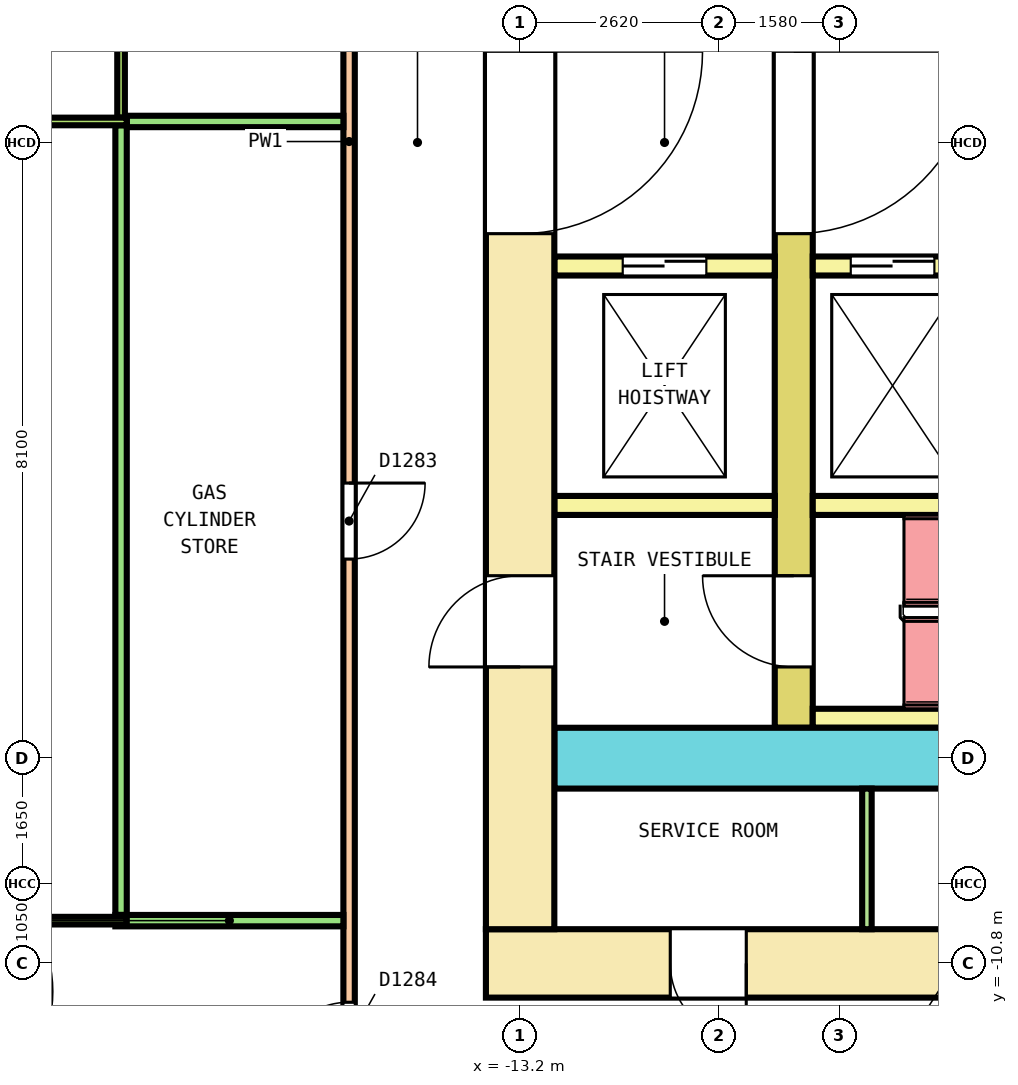
"""IFC4 building model, lengths in metres.
Left out: names, types, materials, properties, quantities, classifications, styles, units other than length and angle.
Written with IfcOpenShell. Run it as: python <this file> out.ifc"""

import sys

from ifc_helpers import new_model, si_unit, direction, frame, frame_2d, origin, place, context, subcontext, project, spatial, polyline, rectangle, outline, extrude, element, fill, save


model = new_model("IFC4")
c1 = context("Model", 3, precision=1e-05, world=origin(), true_north=direction((0.0, 1.0)))
c2 = subcontext(c1, "Body", "Model", "MODEL_VIEW")
j1 = project(units=[si_unit("LENGTHUNIT", "METRE"), si_unit("PLANEANGLEUNIT", "RADIAN")], contexts=[c1])
p1 = place(None, origin())
s1 = spatial("IfcSite", under=j1, at=p1, CompositionType="ELEMENT")
p2 = place(p1, origin())
s2 = spatial("IfcBuilding", under=s1, at=p2, CompositionType="ELEMENT")
p3 = place(p2, frame((0.0, 0.0, 23.4)))
s3 = spatial("IfcBuildingStorey", under=s2, at=p3, CompositionType="ELEMENT", Elevation=23.4)
p4 = place(p3, frame((-25.772, -3.161, 0.0), z_axis=(0.0, 0.0, 1.0), x_axis=(0.500001833672, -0.866024345111, 0.0)))
e1 = element("IfcWall", 1, at=p4, inside=s3, PredefinedType="SOLIDWALL", context=c2, shape_type="SweptSolid", body=[
    extrude(outline(polyline([(-0.027, -0.1), (0.991, -0.1), (2.008, -0.1), (3.026, -0.1), (4.043, -0.1), (5.061, -0.1), (6.079, -0.1), (7.096, -0.1), (8.114, -0.1), (9.131, -0.1), (10.149, -0.1), (11.167, -0.1), (12.184, -0.1), (13.202, -0.1), (14.219, -0.1), (15.237, -0.1), (16.254, -0.1), (17.272, -0.1), (18.29, -0.1), (19.307, -0.1), (20.325, -0.1), (20.271, 0.1), (19.259, 0.1), (18.247, 0.1), (17.234, 0.1), (16.222, 0.1), (15.21, 0.1), (14.198, 0.1), (13.186, 0.1), (12.173, 0.1), (11.161, 0.1), (10.149, 0.1), (9.137, 0.1), (8.125, 0.1), (7.112, 0.1), (6.1, 0.1), (5.088, 0.1), (4.076, 0.1), (3.063, 0.1), (2.051, 0.1), (1.039, 0.1), (0.027, 0.1), (-0.027, -0.1)])), origin(), (0.0, 0.0, 1.0), 4.1),
])
p5 = place(p4, frame((0.38, 0.0, 0.1)))
e2 = element("IfcOpeningElement", 2, at=p5, cuts=e1, PredefinedType="OPENING", context=c2, shape_type="SweptSolid", body=[
    extrude(rectangle(XDim=3.3, YDim=2.9, at=frame_2d((1.65, 1.45))), frame((0.0, 0.11, 0.0), z_axis=(0.0, -1.0, 0.0), x_axis=(1.0, 0.0, 0.0)), (0.0, 0.0, 1.0), 0.22),
])
p6 = place(p4, frame((4.439, 0.0, 0.1)))
e3 = element("IfcOpeningElement", 3, at=p6, cuts=e1, PredefinedType="OPENING", context=c2, shape_type="SweptSolid", body=[
    extrude(rectangle(XDim=3.3, YDim=2.9, at=frame_2d((1.65, 1.45))), frame((0.0, 0.11, 0.0), z_axis=(0.0, -1.0, 0.0), x_axis=(1.0, 0.0, 0.0)), (0.0, 0.0, 1.0), 0.22),
])
p7 = place(p4, frame((9.249, 0.0, 0.0)))
e4 = element("IfcOpeningElement", 4, at=p7, cuts=e1, PredefinedType="OPENING", context=c2, shape_type="SweptSolid", body=[
    extrude(rectangle(XDim=1.8, YDim=2.4, at=frame_2d((0.9, 1.2))), frame((0.0, 0.11, 0.0), z_axis=(0.0, -1.0, 0.0), x_axis=(1.0, 0.0, 0.0)), (0.0, 0.0, 1.0), 0.22),
])
p8 = place(p4, frame((9.249, 0.0, 2.55)))
e5 = element("IfcOpeningElement", 5, at=p8, cuts=e1, PredefinedType="OPENING", context=c2, shape_type="SweptSolid", body=[
    extrude(rectangle(XDim=1.8, YDim=0.45, at=frame_2d((0.9, 0.225))), frame((0.0, 0.11, 0.0), z_axis=(0.0, -1.0, 0.0), x_axis=(1.0, 0.0, 0.0)), (0.0, 0.0, 1.0), 0.22),
])
p9 = place(p4, frame((12.559, 0.0, 0.1)))
e6 = element("IfcOpeningElement", 6, at=p9, cuts=e1, PredefinedType="OPENING", context=c2, shape_type="SweptSolid", body=[
    extrude(rectangle(XDim=3.3, YDim=2.9, at=frame_2d((1.65, 1.45))), frame((0.0, 0.11, 0.0), z_axis=(0.0, -1.0, 0.0), x_axis=(1.0, 0.0, 0.0)), (0.0, 0.0, 1.0), 0.22),
])
p10 = place(p4, frame((16.618, 0.0, 0.1)))
e7 = element("IfcOpeningElement", 7, at=p10, cuts=e1, PredefinedType="OPENING", context=c2, shape_type="SweptSolid", body=[
    extrude(rectangle(XDim=3.3, YDim=2.9, at=frame_2d((1.65, 1.45))), frame((0.0, 0.11, 0.0), z_axis=(0.0, -1.0, 0.0), x_axis=(1.0, 0.0, 0.0)), (0.0, 0.0, 1.0), 0.22),
])
p11 = place(p3, frame((-13.65, -10.8, 0.0), z_axis=(0.0, 0.0, 1.0), x_axis=(1.0, 0.0, 0.0)))
e8 = element("IfcWall", 8, at=p11, inside=s3, PredefinedType="SHEAR", context=c2, shape_type="SweptSolid", body=[
    extrude(rectangle(XDim=27.3, YDim=0.9, at=frame_2d((13.65, 0.0))), origin(), (0.0, 0.0, 1.0), 4.1),
])
p12 = place(p11, frame((2.425, 0.0, 0.0)))
e9 = element("IfcOpeningElement", 9, at=p12, cuts=e8, PredefinedType="OPENING", context=c2, shape_type="SweptSolid", body=[
    extrude(rectangle(XDim=1.0, YDim=2.1, at=frame_2d((0.5, 1.05))), frame((0.0, 0.46, 0.0), z_axis=(0.0, -1.0, 0.0), x_axis=(1.0, 0.0, 0.0)), (0.0, 0.0, 1.0), 0.92),
])
p13 = place(p11, frame((6.569, 0.0, 0.0)))
e10 = element("IfcOpeningElement", 10, at=p13, cuts=e8, PredefinedType="OPENING", context=c2, shape_type="SweptSolid", body=[
    extrude(rectangle(XDim=1.0, YDim=2.1, at=frame_2d((0.5, 1.05))), frame((0.0, 0.46, 0.0), z_axis=(0.0, -1.0, 0.0), x_axis=(1.0, 0.0, 0.0)), (0.0, 0.0, 1.0), 0.92),
])
p14 = place(p11, frame((10.681, 0.0, 0.0)))
e11 = element("IfcOpeningElement", 11, at=p14, cuts=e8, PredefinedType="OPENING", context=c2, shape_type="SweptSolid", body=[
    extrude(rectangle(XDim=1.0, YDim=2.1, at=frame_2d((0.5, 1.05))), frame((0.0, 0.46, 0.0), z_axis=(0.0, -1.0, 0.0), x_axis=(1.0, 0.0, 0.0)), (0.0, 0.0, 1.0), 0.92),
])
p15 = place(p11, frame((19.202, 0.0, 0.0)))
e12 = element("IfcOpeningElement", 12, at=p15, cuts=e8, PredefinedType="OPENING", context=c2, shape_type="SweptSolid", body=[
    extrude(rectangle(XDim=1.0, YDim=2.1, at=frame_2d((0.5, 1.05))), frame((0.0, 0.46, 0.0), z_axis=(0.0, -1.0, 0.0), x_axis=(1.0, 0.0, 0.0)), (0.0, 0.0, 1.0), 0.92),
])
p16 = place(p11, frame((21.881, 0.0, 0.0)))
e13 = element("IfcOpeningElement", 13, at=p16, cuts=e8, PredefinedType="OPENING", context=c2, shape_type="SweptSolid", body=[
    extrude(rectangle(XDim=1.0, YDim=2.1, at=frame_2d((0.5, 1.05))), frame((0.0, 0.46, 0.0), z_axis=(0.0, -1.0, 0.0), x_axis=(1.0, 0.0, 0.0)), (0.0, 0.0, 1.0), 0.92),
])
p17 = place(p11, frame((24.592, 0.0, 0.0)))
e14 = element("IfcOpeningElement", 14, at=p17, cuts=e8, PredefinedType="OPENING", context=c2, shape_type="SweptSolid", body=[
    extrude(rectangle(XDim=1.0, YDim=2.1, at=frame_2d((0.5, 1.05))), frame((0.0, 0.46, 0.0), z_axis=(0.0, -1.0, 0.0), x_axis=(1.0, 0.0, 0.0)), (0.0, 0.0, 1.0), 0.92),
])
p18 = place(p11, frame((15.2, 0.0, 0.0)))
e15 = element("IfcOpeningElement", 15, at=p18, cuts=e8, PredefinedType="OPENING", context=c2, shape_type="SweptSolid", body=[
    extrude(rectangle(XDim=1.2, YDim=2.1, at=frame_2d((0.6, 1.05))), frame((0.0, 0.46, 0.0), z_axis=(0.0, -1.0, 0.0), x_axis=(1.0, 0.0, 0.0)), (0.0, 0.0, 1.0), 0.92),
])
p19 = place(p3, frame((-13.2, -10.35, 0.0), z_axis=(0.0, 0.0, 1.0), x_axis=(0.0, 1.0, 0.0)))
e16 = element("IfcWall", 16, at=p19, inside=s3, PredefinedType="SHEAR", context=c2, shape_type="SweptSolid", body=[
    extrude(rectangle(XDim=20.7, YDim=0.9, at=frame_2d((10.35, 0.0))), origin(), (0.0, 0.0, 1.0), 4.1),
])
p20 = place(p19, frame((9.15, 0.0, 0.0)))
e17 = element("IfcOpeningElement", 17, at=p20, cuts=e16, PredefinedType="OPENING", context=c2, shape_type="SweptSolid", body=[
    extrude(rectangle(XDim=2.4, YDim=2.1, at=frame_2d((1.2, 1.05))), frame((0.0, 0.46, 0.0), z_axis=(0.0, -1.0, 0.0), x_axis=(1.0, 0.0, 0.0)), (0.0, 0.0, 1.0), 0.92),
])
p21 = place(p19, frame((16.05, 0.0, 0.0)))
e18 = element("IfcOpeningElement", 18, at=p21, cuts=e16, PredefinedType="OPENING", context=c2, shape_type="SweptSolid", body=[
    extrude(rectangle(XDim=1.2, YDim=2.1, at=frame_2d((0.6, 1.05))), frame((0.0, 0.46, 0.0), z_axis=(0.0, -1.0, 0.0), x_axis=(1.0, 0.0, 0.0)), (0.0, 0.0, 1.0), 0.92),
])
p22 = place(p19, frame((3.45, 0.0, 0.0)))
e19 = element("IfcOpeningElement", 19, at=p22, cuts=e16, PredefinedType="OPENING", context=c2, shape_type="SweptSolid", body=[
    extrude(rectangle(XDim=1.2, YDim=2.1, at=frame_2d((0.6, 1.05))), frame((0.0, 0.46, 0.0), z_axis=(0.0, -1.0, 0.0), x_axis=(1.0, 0.0, 0.0)), (0.0, 0.0, 1.0), 0.92),
])
p23 = place(p3, frame((-12.75, -8.1, 0.0), z_axis=(0.0, 0.0, 1.0), x_axis=(1.0, 0.0, 0.0)))
e20 = element("IfcWall", 20, at=p23, inside=s3, PredefinedType="SHEAR", context=c2, shape_type="SweptSolid", body=[
    extrude(rectangle(XDim=25.5, YDim=0.8, at=frame_2d((12.75, 0.0))), origin(), (0.0, 0.0, 1.0), 4.1),
])
p24 = place(p23, frame((14.3, 0.0, 0.0)))
e21 = element("IfcOpeningElement", 21, at=p24, cuts=e20, PredefinedType="OPENING", context=c2, shape_type="SweptSolid", body=[
    extrude(rectangle(XDim=1.2, YDim=2.1, at=frame_2d((0.6, 1.05))), frame((0.0, 0.41, 0.0), z_axis=(0.0, -1.0, 0.0), x_axis=(1.0, 0.0, 0.0)), (0.0, 0.0, 1.0), 0.82),
])
p25 = place(p3, frame((-9.6, -7.7, 0.0), z_axis=(0.0, 0.0, 1.0), x_axis=(0.0, 1.0, 0.0)))
e22 = element("IfcWall", 22, at=p25, inside=s3, PredefinedType="SHEAR", context=c2, shape_type="SweptSolid", body=[
    extrude(rectangle(XDim=15.4, YDim=0.5, at=frame_2d((7.7, 0.0))), origin(), (0.0, 0.0, 1.0), 4.1),
])
p26 = place(p25, frame((6.5, 0.0, 0.0)))
e23 = element("IfcOpeningElement", 23, at=p26, cuts=e22, PredefinedType="OPENING", context=c2, shape_type="SweptSolid", body=[
    extrude(rectangle(XDim=2.4, YDim=2.1, at=frame_2d((1.2, 1.05))), frame((0.0, 0.26, 0.0), z_axis=(0.0, -1.0, 0.0), x_axis=(1.0, 0.0, 0.0)), (0.0, 0.0, 1.0), 0.52),
])
p27 = place(p25, frame((13.4, 0.0, 0.0)))
e24 = element("IfcOpeningElement", 24, at=p27, cuts=e22, PredefinedType="OPENING", context=c2, shape_type="SweptSolid", body=[
    extrude(rectangle(XDim=1.2, YDim=2.1, at=frame_2d((0.6, 1.05))), frame((0.0, 0.26, 0.0), z_axis=(0.0, -1.0, 0.0), x_axis=(1.0, 0.0, 0.0)), (0.0, 0.0, 1.0), 0.52),
])
p28 = place(p25, frame((0.8, 0.0, 0.0)))
e25 = element("IfcOpeningElement", 25, at=p28, cuts=e22, PredefinedType="OPENING", context=c2, shape_type="SweptSolid", body=[
    extrude(rectangle(XDim=1.2, YDim=2.1, at=frame_2d((0.6, 1.05))), frame((0.0, 0.26, 0.0), z_axis=(0.0, -1.0, 0.0), x_axis=(1.0, 0.0, 0.0)), (0.0, 0.0, 1.0), 0.52),
])
p29 = place(p3, frame((-12.75, -1.625, 0.0), z_axis=(0.0, 0.0, 1.0), x_axis=(1.0, 0.0, 0.0)))
e26 = element("IfcWall", 26, at=p29, inside=s3, PredefinedType="SOLIDWALL", context=c2, shape_type="SweptSolid", body=[
    extrude(rectangle(XDim=2.9, YDim=0.25, at=frame_2d((1.45, 0.0))), origin(), (0.0, 0.0, 1.0), 4.1),
])
p30 = place(p29, frame((0.9, 0.0, 0.0)))
e27 = element("IfcOpeningElement", 27, at=p30, cuts=e26, PredefinedType="OPENING", context=c2, shape_type="SweptSolid", body=[
    extrude(rectangle(XDim=1.1, YDim=2.1, at=frame_2d((0.55, 1.05))), frame((0.0, 0.135, 0.0), z_axis=(0.0, -1.0, 0.0), x_axis=(1.0, 0.0, 0.0)), (0.0, 0.0, 1.0), 0.27),
])
p31 = place(p3, frame((-9.35, -1.625, 0.0), z_axis=(0.0, 0.0, 1.0), x_axis=(1.0, 0.0, 0.0)))
e28 = element("IfcWall", 28, at=p31, inside=s3, PredefinedType="SOLIDWALL", context=c2, shape_type="SweptSolid", body=[
    extrude(rectangle(XDim=18.7, YDim=0.25, at=frame_2d((9.35, 0.0))), origin(), (0.0, 0.0, 1.0), 4.1),
])
p32 = place(p31, frame((0.5, 0.0, 0.0)))
e29 = element("IfcOpeningElement", 29, at=p32, cuts=e28, PredefinedType="OPENING", context=c2, shape_type="SweptSolid", body=[
    extrude(rectangle(XDim=1.1, YDim=2.1, at=frame_2d((0.55, 1.05))), frame((0.0, 0.135, 0.0), z_axis=(0.0, -1.0, 0.0), x_axis=(1.0, 0.0, 0.0)), (0.0, 0.0, 1.0), 0.27),
])
p33 = place(p31, frame((17.1, 0.0, 0.0)))
e30 = element("IfcOpeningElement", 30, at=p33, cuts=e28, PredefinedType="OPENING", context=c2, shape_type="SweptSolid", body=[
    extrude(rectangle(XDim=1.1, YDim=2.1, at=frame_2d((0.55, 1.05))), frame((0.0, 0.135, 0.0), z_axis=(0.0, -1.0, 0.0), x_axis=(1.0, 0.0, 0.0)), (0.0, 0.0, 1.0), 0.27),
])
p34 = place(p3, frame((-12.75, -4.775, 0.0), z_axis=(0.0, 0.0, 1.0), x_axis=(1.0, 0.0, 0.0)))
e31 = element("IfcWall", 31, at=p34, inside=s3, PredefinedType="SOLIDWALL", context=c2, shape_type="SweptSolid", body=[
    extrude(rectangle(XDim=2.9, YDim=0.25, at=frame_2d((1.45, 0.0))), origin(), (0.0, 0.0, 1.0), 4.1),
])
p35 = place(p3, frame((-9.35, -4.775, 0.0), z_axis=(0.0, 0.0, 1.0), x_axis=(1.0, 0.0, 0.0)))
e32 = element("IfcWall", 32, at=p35, inside=s3, PredefinedType="SOLIDWALL", context=c2, shape_type="SweptSolid", body=[
    extrude(rectangle(XDim=18.7, YDim=0.25, at=frame_2d((9.35, 0.0))), origin(), (0.0, 0.0, 1.0), 4.1),
])
p36 = place(p3, frame((-9.35, -7.575, 0.0), z_axis=(0.0, 0.0, 1.0), x_axis=(1.0, 0.0, 0.0)))
e33 = element("IfcWall", 33, at=p36, inside=s3, PredefinedType="SOLIDWALL", context=c2, shape_type="SweptSolid", body=[
    extrude(rectangle(XDim=5.8, YDim=0.25, at=frame_2d((2.9, 0.0))), origin(), (0.0, 0.0, 1.0), 4.1),
])
p37 = place(p3, frame((-8.637, -10.35, 0.0), z_axis=(0.0, 0.0, 1.0), x_axis=(0.0, 1.0, 0.0)))
e34 = element("IfcWall", 34, at=p37, inside=s3, PredefinedType="PARTITIONING", context=c2, shape_type="SweptSolid", body=[
    extrude(rectangle(XDim=1.85, YDim=0.125, at=frame_2d((0.925, 0.0))), origin(), (0.0, 0.0, 1.0), 4.1),
])
p38 = place(p3, frame((-15.45, -12.975, 0.0), z_axis=(0.0, 0.0, 1.0), x_axis=(0.0, 1.0, 0.0)))
e35 = element("IfcWall", 35, at=p38, inside=s3, PredefinedType="PARTITIONING", context=c2, shape_type="SweptSolid", body=[
    extrude(rectangle(XDim=25.975, YDim=0.15, at=frame_2d((12.988, 0.0))), origin(), (0.0, 0.0, 1.0), 3.05),
])
p39 = place(p38, frame((24.452, 0.0, 0.0)))
e36 = element("IfcOpeningElement", 36, at=p39, cuts=e35, PredefinedType="OPENING", context=c2, shape_type="SweptSolid", body=[
    extrude(rectangle(XDim=1.0, YDim=2.1, at=frame_2d((0.5, 1.05))), frame((0.0, 0.085, 0.0), z_axis=(0.0, -1.0, 0.0), x_axis=(1.0, 0.0, 0.0)), (0.0, 0.0, 1.0), 0.17),
])
p40 = place(p38, frame((15.722, 0.0, 0.0)))
e37 = element("IfcOpeningElement", 37, at=p40, cuts=e35, PredefinedType="OPENING", context=c2, shape_type="SweptSolid", body=[
    extrude(rectangle(XDim=1.0, YDim=2.1, at=frame_2d((0.5, 1.05))), frame((0.0, 0.085, 0.0), z_axis=(0.0, -1.0, 0.0), x_axis=(1.0, 0.0, 0.0)), (0.0, 0.0, 1.0), 0.17),
])
p41 = place(p38, frame((7.494, 0.0, 0.0)))
e38 = element("IfcOpeningElement", 38, at=p41, cuts=e35, PredefinedType="OPENING", context=c2, shape_type="SweptSolid", body=[
    extrude(rectangle(XDim=1.0, YDim=2.1, at=frame_2d((0.5, 1.05))), frame((0.0, 0.085, 0.0), z_axis=(0.0, -1.0, 0.0), x_axis=(1.0, 0.0, 0.0)), (0.0, 0.0, 1.0), 0.17),
])
p42 = place(p38, frame((0.664, 0.0, 0.0)))
e39 = element("IfcOpeningElement", 39, at=p42, cuts=e35, PredefinedType="OPENING", context=c2, shape_type="SweptSolid", body=[
    extrude(rectangle(XDim=1.0, YDim=2.1, at=frame_2d((0.5, 1.05))), frame((0.0, 0.085, 0.0), z_axis=(0.0, -1.0, 0.0), x_axis=(1.0, 0.0, 0.0)), (0.0, 0.0, 1.0), 0.17),
])
p43 = place(p3, frame((-18.375, 0.277, 0.0), z_axis=(0.0, 0.0, 1.0), x_axis=(1.0, 0.0, 0.0)))
e40 = element("IfcWall", 40, at=p43, inside=s3, PredefinedType="PARTITIONING", context=c2, shape_type="SweptSolid", body=[
    extrude(rectangle(XDim=2.85, YDim=0.15, at=frame_2d((1.425, 0.0))), origin(), (0.0, 0.0, 1.0), 3.05),
])
p44 = place(p3, frame((-18.45, -10.163, 0.0), z_axis=(0.0, 0.0, 1.0), x_axis=(0.0, 1.0, 0.0)))
e41 = element("IfcWall", 41, at=p44, inside=s3, PredefinedType="PARTITIONING", context=c2, shape_type="SweptSolid", body=[
    extrude(rectangle(XDim=10.389, YDim=0.15, at=frame_2d((5.195, 0.0))), origin(), (0.0, 0.0, 1.0), 3.05),
])
p45 = place(p3, frame((-18.525, -10.238, 0.0), z_axis=(0.0, 0.0, 1.0), x_axis=(1.0, 0.0, 0.0)))
e42 = element("IfcWall", 42, at=p45, inside=s3, PredefinedType="PARTITIONING", context=c2, shape_type="SweptSolid", body=[
    extrude(rectangle(XDim=3.0, YDim=0.15, at=frame_2d((1.5, 0.0))), origin(), (0.0, 0.0, 1.0), 4.1),
])
p46 = place(p3, frame((-18.45, 0.327, 0.0), z_axis=(0.0, 0.0, 1.0), x_axis=(0.0, 1.0, 0.0)))
e43 = element("IfcWall", 43, at=p46, inside=s3, PredefinedType="PARTITIONING", context=c2, shape_type="SweptSolid", body=[
    extrude(rectangle(XDim=10.082, YDim=0.1, at=frame_2d((5.041, 0.0))), origin(), (0.0, 0.0, 1.0), 3.05),
])
p47 = place(p46, frame((6.512, 0.0, 0.0)))
e44 = element("IfcOpeningElement", 44, at=p47, cuts=e43, PredefinedType="OPENING", context=c2, shape_type="SweptSolid", body=[
    extrude(rectangle(XDim=1.2, YDim=2.1, at=frame_2d((0.6, 1.05))), frame((0.0, 0.06, 0.0), z_axis=(0.0, -1.0, 0.0), x_axis=(1.0, 0.0, 0.0)), (0.0, 0.0, 1.0), 0.12),
])
p48 = place(p3, frame((-25.673, 0.277, 0.0), z_axis=(0.0, 0.0, 1.0), x_axis=(1.0, 0.0, 0.0)))
e45 = element("IfcWall", 45, at=p48, inside=s3, PredefinedType="PARTITIONING", context=c2, shape_type="SweptSolid", body=[
    extrude(rectangle(XDim=7.298, YDim=0.1, at=frame_2d((3.649, 0.0))), origin(), (0.0, 0.0, 1.0), 3.05),
])
p49 = place(p48, frame((2.283, 0.0, 0.0)))
e46 = element("IfcOpeningElement", 46, at=p49, cuts=e45, PredefinedType="OPENING", context=c2, shape_type="SweptSolid", body=[
    extrude(rectangle(XDim=1.0, YDim=2.1, at=frame_2d((0.5, 1.05))), frame((0.0, 0.06, 0.0), z_axis=(0.0, -1.0, 0.0), x_axis=(1.0, 0.0, 0.0)), (0.0, 0.0, 1.0), 0.12),
])
p50 = place(p3, frame((-21.571, -10.238, 0.0), z_axis=(0.0, 0.0, 1.0), x_axis=(1.0, 0.0, 0.0)))
e47 = element("IfcWall", 47, at=p50, inside=s3, PredefinedType="PARTITIONING", context=c2, shape_type="SweptSolid", body=[
    extrude(rectangle(XDim=3.196, YDim=0.1, at=frame_2d((1.598, 0.0))), origin(), (0.0, 0.0, 1.0), 3.05),
])
p51 = place(p30, origin())
e48 = element("IfcDoor", 48, at=p51, inside=s3, OperationType="DOUBLE_DOOR_SLIDING", PredefinedType="DOOR", context=c2, shape_type="SweptSolid", body=[
    extrude(rectangle(XDim=1.1, YDim=2.1, at=frame_2d((0.55, 1.05))), frame((0.0, 0.075, 0.0), z_axis=(0.0, -1.0, 0.0), x_axis=(1.0, 0.0, 0.0)), (0.0, 0.0, 1.0), 0.15),
])
fill(e27, e48)
p52 = place(p32, origin())
e49 = element("IfcDoor", 49, at=p52, inside=s3, OperationType="DOUBLE_DOOR_SLIDING", PredefinedType="DOOR", context=c2, shape_type="SweptSolid", body=[
    extrude(rectangle(XDim=1.1, YDim=2.1, at=frame_2d((0.55, 1.05))), frame((0.0, 0.075, 0.0), z_axis=(0.0, -1.0, 0.0), x_axis=(1.0, 0.0, 0.0)), (0.0, 0.0, 1.0), 0.15),
])
fill(e29, e49)
p53 = place(p26, origin())
e50 = element("IfcDoor", 50, at=p53, inside=s3, OperationType="DOUBLE_DOOR_SINGLE_SWING", PredefinedType="DOOR", context=c2, shape_type="SweptSolid", body=[
    extrude(rectangle(XDim=2.4, YDim=2.1, at=frame_2d((1.2, 1.05))), frame((0.0, 0.2, 0.0), z_axis=(0.0, -1.0, 0.0), x_axis=(1.0, 0.0, 0.0)), (0.0, 0.0, 1.0), 0.4),
])
fill(e23, e50)
p54 = place(p20, origin())
e51 = element("IfcDoor", 51, at=p54, inside=s3, OperationType="DOUBLE_DOOR_SINGLE_SWING", PredefinedType="DOOR", context=c2, shape_type="SweptSolid", body=[
    extrude(rectangle(XDim=2.4, YDim=2.1, at=frame_2d((1.2, 1.05))), frame((0.0, 0.3, 0.0), z_axis=(0.0, -1.0, 0.0), x_axis=(1.0, 0.0, 0.0)), (0.0, 0.0, 1.0), 0.6),
])
fill(e17, e51)
p55 = place(p28, origin())
e52 = element("IfcDoor", 52, at=p55, inside=s3, OperationType="SINGLE_SWING_LEFT", PredefinedType="DOOR", context=c2, shape_type="SweptSolid", body=[
    extrude(rectangle(XDim=1.2, YDim=2.1, at=frame_2d((0.6, 1.05))), frame((0.0, 0.2, 0.0), z_axis=(0.0, -1.0, 0.0), x_axis=(1.0, 0.0, 0.0)), (0.0, 0.0, 1.0), 0.4),
])
fill(e25, e52)
p56 = place(p22, origin())
e53 = element("IfcDoor", 53, at=p56, inside=s3, OperationType="SINGLE_SWING_RIGHT", PredefinedType="DOOR", context=c2, shape_type="SweptSolid", body=[
    extrude(rectangle(XDim=1.2, YDim=2.1, at=frame_2d((0.6, 1.05))), frame((0.0, 0.3, 0.0), z_axis=(0.0, -1.0, 0.0), x_axis=(1.0, 0.0, 0.0)), (0.0, 0.0, 1.0), 0.6),
])
fill(e19, e53)
p57 = place(p12, origin())
e54 = element("IfcDoor", 54, at=p57, inside=s3, OperationType="SINGLE_SWING_LEFT", PredefinedType="DOOR", context=c2, shape_type="SweptSolid", body=[
    extrude(rectangle(XDim=1.0, YDim=2.1, at=frame_2d((0.5, 1.05))), frame((0.0, 0.3, 0.0), z_axis=(0.0, -1.0, 0.0), x_axis=(1.0, 0.0, 0.0)), (0.0, 0.0, 1.0), 0.6),
])
fill(e9, e54)
p58 = place(p41, origin())
e55 = element("IfcDoor", 55, at=p58, inside=s3, OperationType="SINGLE_SWING_RIGHT", PredefinedType="DOOR", context=c2, shape_type="SweptSolid", body=[
    extrude(rectangle(XDim=1.0, YDim=2.1, at=frame_2d((0.5, 1.05))), frame((0.0, 0.025, 0.0), z_axis=(0.0, -1.0, 0.0), x_axis=(1.0, 0.0, 0.0)), (0.0, 0.0, 1.0), 0.05),
])
fill(e38, e55)
p59 = place(p42, origin())
e56 = element("IfcDoor", 56, at=p59, inside=s3, OperationType="SINGLE_SWING_LEFT", PredefinedType="DOOR", context=c2, shape_type="SweptSolid", body=[
    extrude(rectangle(XDim=1.0, YDim=2.1, at=frame_2d((0.5, 1.05))), frame((0.0, 0.025, 0.0), z_axis=(0.0, -1.0, 0.0), x_axis=(1.0, 0.0, 0.0)), (0.0, 0.0, 1.0), 0.05),
])
fill(e39, e56)
save(model, sys.argv[1])
